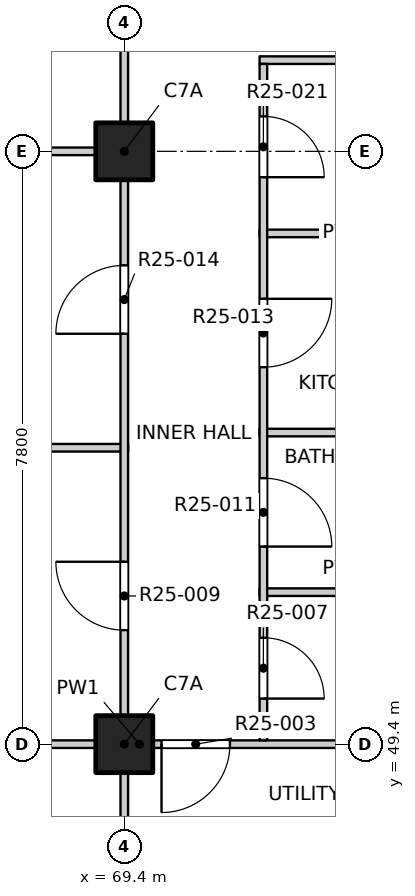
"""IFC4 building model, lengths in metres.
Left out: names, types, materials, properties, quantities, classifications, styles, units other than length and angle.
Written with IfcOpenShell. Run it as: python <this file> out.ifc"""

import sys

from ifc_helpers import new_model, si_unit, direction, frame, frame_2d, origin, origin_2d, place, context, subcontext, project, spatial, rectangle, extrude, element, fill, save


model = new_model("IFC4")
c1 = context("Model", 3, precision=1e-05, world=origin(), true_north=direction((0.0, 1.0)))
c2 = subcontext(c1, "Body", "Model", "MODEL_VIEW")
j1 = project(units=[si_unit("LENGTHUNIT", "METRE"), si_unit("PLANEANGLEUNIT", "RADIAN")], contexts=[c1])
p1 = place(None, origin())
s1 = spatial("IfcSite", under=j1, at=p1, CompositionType="ELEMENT")
p2 = place(p1, origin())
s2 = spatial("IfcBuilding", under=s1, at=p2, CompositionType="ELEMENT")
p3 = place(p2, frame((0.0, 0.0, 252.8)))
s3 = spatial("IfcBuildingStorey", under=s2, at=p3, CompositionType="ELEMENT", Elevation=252.8)
for number, where, z_axis, x_axis in (
    (1, (69.4, 49.4, -0.25), (0.0, 0.0, 1.0), (1.0, 0.0, 0.0)),
    (2, (69.4, 57.2, -0.25), (0.0, 0.0, 1.0), (1.0, 0.0, 0.0)),
):
    element("IfcColumn", number, at=place(p3, frame(where, z_axis=z_axis, x_axis=x_axis)), inside=s3, PredefinedType="COLUMN", context=c2, shape_type="SweptSolid", body=[
        extrude(rectangle(XDim=0.75, YDim=0.75, at=origin_2d()), origin(), (0.0, 0.0, 1.0), 3.4),
    ])
p4 = place(p3, frame((65.8, 49.4, 0.0), z_axis=(0.0, 0.0, 1.0), x_axis=(1.0, 0.0, 0.0)))
e3 = element("IfcWall", 3, at=p4, inside=s3, PredefinedType="PARTITIONING", context=c2, shape_type="SweptSolid", body=[
    extrude(rectangle(XDim=7.6, YDim=0.1, at=frame_2d((3.8, 0.0))), origin(), (0.0, 0.0, 1.0), 3.15),
])
p5 = place(p4, frame((4.09, 0.0, 0.0)))
e4 = element("IfcOpeningElement", 4, at=p5, cuts=e3, PredefinedType="OPENING", context=c2, shape_type="SweptSolid", body=[
    extrude(rectangle(XDim=0.9, YDim=2.1, at=frame_2d((0.45, 1.05))), frame((0.0, 0.06, 0.0), z_axis=(0.0, -1.0, 0.0), x_axis=(1.0, 0.0, 0.0)), (0.0, 0.0, 1.0), 0.12),
])
p6 = place(p3, frame((71.18, 51.4, 0.0), z_axis=(0.0, 0.0, 1.0), x_axis=(1.0, 0.0, 0.0)))
e5 = element("IfcWall", 5, at=p6, inside=s3, PredefinedType="PARTITIONING", context=c2, shape_type="SweptSolid", body=[
    extrude(rectangle(XDim=2.22, YDim=0.1, at=frame_2d((1.11, 0.0))), origin(), (0.0, 0.0, 1.0), 3.15),
])
p7 = place(p3, frame((65.8, 53.3, 0.0), z_axis=(0.0, 0.0, 1.0), x_axis=(1.0, 0.0, 0.0)))
e6 = element("IfcWall", 6, at=p7, inside=s3, PredefinedType="PARTITIONING", context=c2, shape_type="SweptSolid", body=[
    extrude(rectangle(XDim=3.65, YDim=0.1, at=frame_2d((1.825, 0.0))), origin(), (0.0, 0.0, 1.0), 3.15),
])
for number, where, z_axis, x_axis in (
    (7, (71.18, 53.5, 0.0), (0.0, 0.0, 1.0), (1.0, 0.0, 0.0)),
    (8, (71.18, 56.12, 0.0), (0.0, 0.0, 1.0), (1.0, 0.0, 0.0)),
):
    element("IfcWall", number, at=place(p3, frame(where, z_axis=z_axis, x_axis=x_axis)), inside=s3, PredefinedType="PARTITIONING", context=c2, shape_type="SweptSolid", body=[
        extrude(rectangle(XDim=2.22, YDim=0.1, at=frame_2d((1.11, 0.0))), origin(), (0.0, 0.0, 1.0), 3.15),
    ])
p8 = place(p3, frame((65.8, 57.2, 0.0), z_axis=(0.0, 0.0, 1.0), x_axis=(1.0, 0.0, 0.0)))
e9 = element("IfcWall", 9, at=p8, inside=s3, PredefinedType="PARTITIONING", context=c2, shape_type="SweptSolid", body=[
    extrude(rectangle(XDim=3.65, YDim=0.1, at=frame_2d((1.825, 0.0))), origin(), (0.0, 0.0, 1.0), 3.15),
])
p9 = place(p3, frame((71.18, 58.4, 0.0), z_axis=(0.0, 0.0, 1.0), x_axis=(1.0, 0.0, 0.0)))
e10 = element("IfcWall", 10, at=p9, inside=s3, PredefinedType="PARTITIONING", context=c2, shape_type="SweptSolid", body=[
    extrude(rectangle(XDim=2.22, YDim=0.1, at=frame_2d((1.11, 0.0))), origin(), (0.0, 0.0, 1.0), 3.15),
])
p10 = place(p3, frame((69.4, 45.8, 0.0), z_axis=(0.0, 0.0, 1.0), x_axis=(0.0, 1.0, 0.0)))
e11 = element("IfcWall", 11, at=p10, inside=s3, PredefinedType="PARTITIONING", context=c2, shape_type="SweptSolid", body=[
    extrude(rectangle(XDim=38.4, YDim=0.1, at=frame_2d((19.2, 0.0))), origin(), (0.0, 0.0, 1.0), 3.15),
])
p11 = place(p10, frame((1.05, 0.0, 0.0)))
e12 = element("IfcOpeningElement", 12, at=p11, cuts=e11, PredefinedType="OPENING", context=c2, shape_type="SweptSolid", body=[
    extrude(rectangle(XDim=1.2, YDim=2.1, at=frame_2d((0.6, 1.05))), frame((0.0, 0.06, 0.0), z_axis=(0.0, -1.0, 0.0), x_axis=(1.0, 0.0, 0.0)), (0.0, 0.0, 1.0), 0.12),
])
p12 = place(p10, frame((5.1, 0.0, 0.0)))
e13 = element("IfcOpeningElement", 13, at=p12, cuts=e11, PredefinedType="OPENING", context=c2, shape_type="SweptSolid", body=[
    extrude(rectangle(XDim=0.9, YDim=2.1, at=frame_2d((0.45, 1.05))), frame((0.0, 0.06, 0.0), z_axis=(0.0, -1.0, 0.0), x_axis=(1.0, 0.0, 0.0)), (0.0, 0.0, 1.0), 0.12),
])
p13 = place(p10, frame((9.0, 0.0, 0.0)))
e14 = element("IfcOpeningElement", 14, at=p13, cuts=e11, PredefinedType="OPENING", context=c2, shape_type="SweptSolid", body=[
    extrude(rectangle(XDim=0.9, YDim=2.1, at=frame_2d((0.45, 1.05))), frame((0.0, 0.06, 0.0), z_axis=(0.0, -1.0, 0.0), x_axis=(1.0, 0.0, 0.0)), (0.0, 0.0, 1.0), 0.12),
])
p14 = place(p10, frame((12.9, 0.0, 0.0)))
e15 = element("IfcOpeningElement", 15, at=p14, cuts=e11, PredefinedType="OPENING", context=c2, shape_type="SweptSolid", body=[
    extrude(rectangle(XDim=0.9, YDim=2.1, at=frame_2d((0.45, 1.05))), frame((0.0, 0.06, 0.0), z_axis=(0.0, -1.0, 0.0), x_axis=(1.0, 0.0, 0.0)), (0.0, 0.0, 1.0), 0.12),
])
p15 = place(p10, frame((16.8, 0.0, 0.0)))
e16 = element("IfcOpeningElement", 16, at=p15, cuts=e11, PredefinedType="OPENING", context=c2, shape_type="SweptSolid", body=[
    extrude(rectangle(XDim=0.9, YDim=2.1, at=frame_2d((0.45, 1.05))), frame((0.0, 0.06, 0.0), z_axis=(0.0, -1.0, 0.0), x_axis=(1.0, 0.0, 0.0)), (0.0, 0.0, 1.0), 0.12),
])
p16 = place(p10, frame((20.7, 0.0, 0.0)))
e17 = element("IfcOpeningElement", 17, at=p16, cuts=e11, PredefinedType="OPENING", context=c2, shape_type="SweptSolid", body=[
    extrude(rectangle(XDim=0.9, YDim=2.1, at=frame_2d((0.45, 1.05))), frame((0.0, 0.06, 0.0), z_axis=(0.0, -1.0, 0.0), x_axis=(1.0, 0.0, 0.0)), (0.0, 0.0, 1.0), 0.12),
])
p17 = place(p10, frame((24.6, 0.0, 0.0)))
e18 = element("IfcOpeningElement", 18, at=p17, cuts=e11, PredefinedType="OPENING", context=c2, shape_type="SweptSolid", body=[
    extrude(rectangle(XDim=0.9, YDim=2.1, at=frame_2d((0.45, 1.05))), frame((0.0, 0.06, 0.0), z_axis=(0.0, -1.0, 0.0), x_axis=(1.0, 0.0, 0.0)), (0.0, 0.0, 1.0), 0.12),
])
p18 = place(p10, frame((28.5, 0.0, 0.0)))
e19 = element("IfcOpeningElement", 19, at=p18, cuts=e11, PredefinedType="OPENING", context=c2, shape_type="SweptSolid", body=[
    extrude(rectangle(XDim=0.9, YDim=2.1, at=frame_2d((0.45, 1.05))), frame((0.0, 0.06, 0.0), z_axis=(0.0, -1.0, 0.0), x_axis=(1.0, 0.0, 0.0)), (0.0, 0.0, 1.0), 0.12),
])
p19 = place(p10, frame((32.4, 0.0, 0.0)))
e20 = element("IfcOpeningElement", 20, at=p19, cuts=e11, PredefinedType="OPENING", context=c2, shape_type="SweptSolid", body=[
    extrude(rectangle(XDim=0.9, YDim=2.1, at=frame_2d((0.45, 1.05))), frame((0.0, 0.06, 0.0), z_axis=(0.0, -1.0, 0.0), x_axis=(1.0, 0.0, 0.0)), (0.0, 0.0, 1.0), 0.12),
])
p20 = place(p10, frame((36.15, 0.0, 0.0)))
e21 = element("IfcOpeningElement", 21, at=p20, cuts=e11, PredefinedType="OPENING", context=c2, shape_type="SweptSolid", body=[
    extrude(rectangle(XDim=1.2, YDim=2.1, at=frame_2d((0.6, 1.05))), frame((0.0, 0.06, 0.0), z_axis=(0.0, -1.0, 0.0), x_axis=(1.0, 0.0, 0.0)), (0.0, 0.0, 1.0), 0.12),
])
p21 = place(p3, frame((71.23, 49.45, 0.0), z_axis=(0.0, 0.0, 1.0), x_axis=(0.0, 1.0, 0.0)))
e22 = element("IfcWall", 22, at=p21, inside=s3, PredefinedType="PARTITIONING", context=c2, shape_type="SweptSolid", body=[
    extrude(rectangle(XDim=8.9, YDim=0.1, at=frame_2d((4.45, 0.0))), origin(), (0.0, 0.0, 1.0), 3.15),
])
p22 = place(p21, frame((0.55, 0.0, 0.0)))
e23 = element("IfcOpeningElement", 23, at=p22, cuts=e22, PredefinedType="OPENING", context=c2, shape_type="SweptSolid", body=[
    extrude(rectangle(XDim=0.8, YDim=2.1, at=frame_2d((0.4, 1.05))), frame((0.0, 0.06, 0.0), z_axis=(0.0, -1.0, 0.0), x_axis=(1.0, 0.0, 0.0)), (0.0, 0.0, 1.0), 0.12),
])
p23 = place(p21, frame((2.55, 0.0, 0.0)))
e24 = element("IfcOpeningElement", 24, at=p23, cuts=e22, PredefinedType="OPENING", context=c2, shape_type="SweptSolid", body=[
    extrude(rectangle(XDim=0.9, YDim=2.1, at=frame_2d((0.45, 1.05))), frame((0.0, 0.06, 0.0), z_axis=(0.0, -1.0, 0.0), x_axis=(1.0, 0.0, 0.0)), (0.0, 0.0, 1.0), 0.12),
])
p24 = place(p21, frame((4.91, 0.0, 0.0)))
e25 = element("IfcOpeningElement", 25, at=p24, cuts=e22, PredefinedType="OPENING", context=c2, shape_type="SweptSolid", body=[
    extrude(rectangle(XDim=0.9, YDim=2.1, at=frame_2d((0.45, 1.05))), frame((0.0, 0.06, 0.0), z_axis=(0.0, -1.0, 0.0), x_axis=(1.0, 0.0, 0.0)), (0.0, 0.0, 1.0), 0.12),
])
p25 = place(p21, frame((7.41, 0.0, 0.0)))
e26 = element("IfcOpeningElement", 26, at=p25, cuts=e22, PredefinedType="OPENING", context=c2, shape_type="SweptSolid", body=[
    extrude(rectangle(XDim=0.8, YDim=2.1, at=frame_2d((0.4, 1.05))), frame((0.0, 0.06, 0.0), z_axis=(0.0, -1.0, 0.0), x_axis=(1.0, 0.0, 0.0)), (0.0, 0.0, 1.0), 0.12),
])
p26 = place(p5, origin())
e27 = element("IfcDoor", 27, at=p26, inside=s3, OperationType="SINGLE_SWING_RIGHT", PredefinedType="DOOR", context=c2, shape_type="SweptSolid", body=[
    extrude(rectangle(XDim=0.9, YDim=2.1, at=frame_2d((0.45, 1.05))), frame((0.0, 0.025, 0.0), z_axis=(0.0, -1.0, 0.0), x_axis=(1.0, 0.0, 0.0)), (0.0, 0.0, 1.0), 0.05),
])
fill(e4, e27)
p27 = place(p22, origin())
e28 = element("IfcDoor", 28, at=p27, inside=s3, OperationType="SINGLE_SWING_RIGHT", PredefinedType="DOOR", context=c2, shape_type="SweptSolid", body=[
    extrude(rectangle(XDim=0.8, YDim=2.1, at=frame_2d((0.4, 1.05))), frame((0.0, 0.025, 0.0), z_axis=(0.0, -1.0, 0.0), x_axis=(1.0, 0.0, 0.0)), (0.0, 0.0, 1.0), 0.05),
])
fill(e23, e28)
p28 = place(p12, origin())
e29 = element("IfcDoor", 29, at=p28, inside=s3, OperationType="SINGLE_SWING_RIGHT", PredefinedType="DOOR", context=c2, shape_type="SweptSolid", body=[
    extrude(rectangle(XDim=0.9, YDim=2.1, at=frame_2d((0.45, 1.05))), frame((0.0, 0.025, 0.0), z_axis=(0.0, -1.0, 0.0), x_axis=(1.0, 0.0, 0.0)), (0.0, 0.0, 1.0), 0.05),
])
fill(e13, e29)
p29 = place(p23, origin())
e30 = element("IfcDoor", 30, at=p29, inside=s3, OperationType="SINGLE_SWING_RIGHT", PredefinedType="DOOR", context=c2, shape_type="SweptSolid", body=[
    extrude(rectangle(XDim=0.9, YDim=2.1, at=frame_2d((0.45, 1.05))), frame((0.0, 0.025, 0.0), z_axis=(0.0, -1.0, 0.0), x_axis=(1.0, 0.0, 0.0)), (0.0, 0.0, 1.0), 0.05),
])
fill(e24, e30)
p30 = place(p24, origin())
e31 = element("IfcDoor", 31, at=p30, inside=s3, OperationType="SINGLE_SWING_LEFT", PredefinedType="DOOR", context=c2, shape_type="SweptSolid", body=[
    extrude(rectangle(XDim=0.9, YDim=2.1, at=frame_2d((0.45, 1.05))), frame((0.0, 0.025, 0.0), z_axis=(0.0, -1.0, 0.0), x_axis=(1.0, 0.0, 0.0)), (0.0, 0.0, 1.0), 0.05),
])
fill(e25, e31)
p31 = place(p13, origin())
e32 = element("IfcDoor", 32, at=p31, inside=s3, OperationType="SINGLE_SWING_LEFT", PredefinedType="DOOR", context=c2, shape_type="SweptSolid", body=[
    extrude(rectangle(XDim=0.9, YDim=2.1, at=frame_2d((0.45, 1.05))), frame((0.0, 0.025, 0.0), z_axis=(0.0, -1.0, 0.0), x_axis=(1.0, 0.0, 0.0)), (0.0, 0.0, 1.0), 0.05),
])
fill(e14, e32)
p32 = place(p25, origin())
e33 = element("IfcDoor", 33, at=p32, inside=s3, OperationType="SINGLE_SWING_RIGHT", PredefinedType="DOOR", context=c2, shape_type="SweptSolid", body=[
    extrude(rectangle(XDim=0.8, YDim=2.1, at=frame_2d((0.4, 1.05))), frame((0.0, 0.025, 0.0), z_axis=(0.0, -1.0, 0.0), x_axis=(1.0, 0.0, 0.0)), (0.0, 0.0, 1.0), 0.05),
])
fill(e26, e33)
save(model, sys.argv[1])
